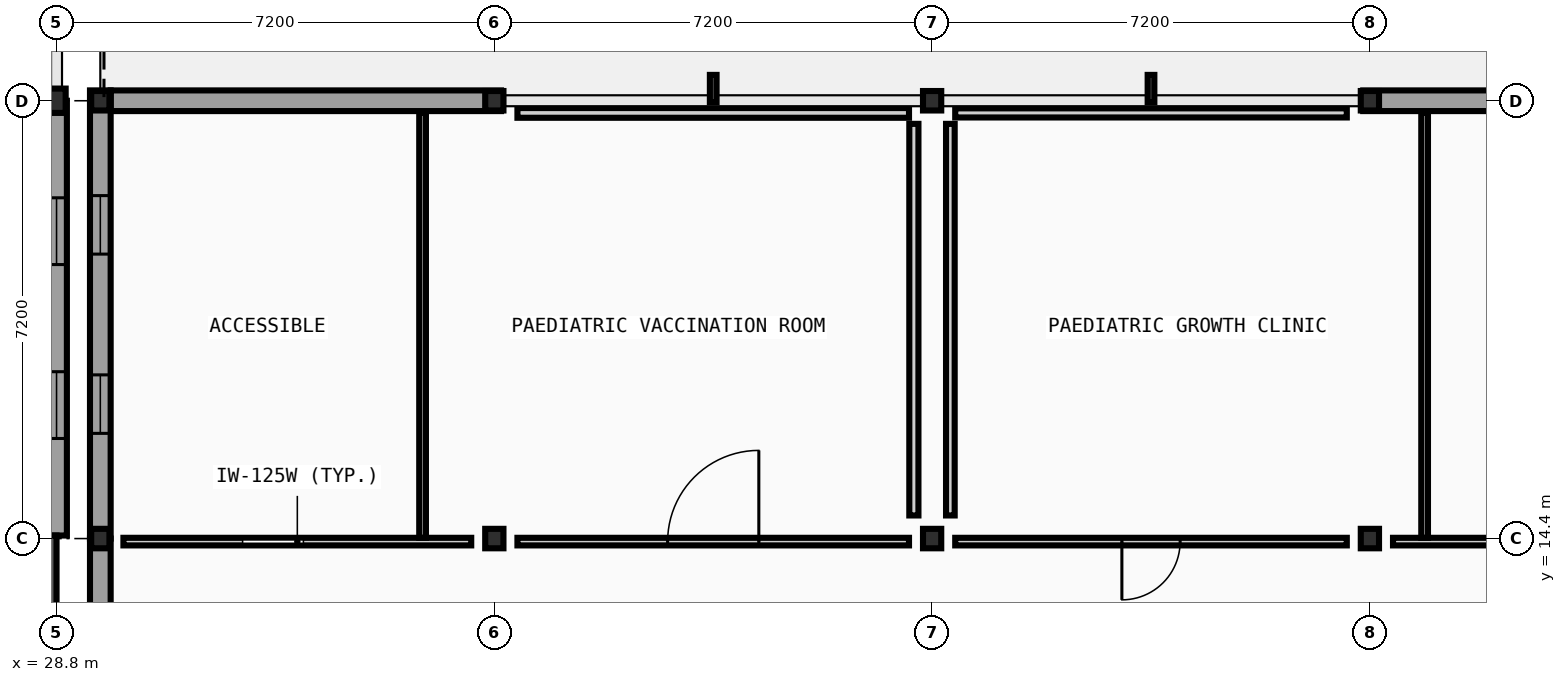
"""IFC4 building model, lengths in metres.
Left out: names, types, materials, properties, quantities, classifications, styles, units other than length and angle.
Written with IfcOpenShell. Run it as: python <this file> out.ifc"""

import sys

from ifc_helpers import new_model, si_unit, direction, frame, frame_2d, origin, origin_2d, place, context, subcontext, project, spatial, rectangle, i_section, extrude, element, fill, save


model = new_model("IFC4")
c1 = context("Model", 3, precision=1e-05, world=origin(), true_north=direction((0.0, 1.0)))
c2 = subcontext(c1, "Body", "Model", "MODEL_VIEW")
j1 = project(units=[si_unit("LENGTHUNIT", "METRE"), si_unit("PLANEANGLEUNIT", "RADIAN")], contexts=[c1])
p1 = place(None, origin())
s1 = spatial("IfcSite", under=j1, at=p1, CompositionType="ELEMENT")
p2 = place(p1, origin())
s2 = spatial("IfcBuilding", under=s1, at=p2, CompositionType="ELEMENT")
p3 = place(p2, frame((0.0, 0.0, 14.0)))
s3 = spatial("IfcBuildingStorey", under=s2, at=p3, CompositionType="ELEMENT", Elevation=14.0)
p4 = place(p3, frame((28.8, 21.6, 0.0), z_axis=(0.0, 0.0, 1.0), x_axis=(1.0, 0.0, 0.0)))
e1 = element("IfcColumn", 1, at=p4, inside=s3, PredefinedType="COLUMN", context=c2, shape_type="SweptSolid", body=[
    extrude(i_section(OverallWidth=0.3, OverallDepth=0.4, WebThickness=0.013, FlangeThickness=0.024, FilletRadius=0.027, at=origin_2d()), origin(), (0.0, 0.0, 1.0), 4.4),
])
for number, where, z_axis, x_axis in (
    (2, (29.52, 14.4, 0.0), (0.0, 0.0, 1.0), (1.0, 0.0, 0.0)),
    (3, (29.52, 21.6, 0.0), (0.0, 0.0, 1.0), (1.0, 0.0, 0.0)),
    (4, (36.0, 14.4, 0.0), (0.0, 0.0, 1.0), (1.0, 0.0, 0.0)),
    (5, (36.0, 21.6, 0.0), (0.0, 0.0, 1.0), (1.0, 0.0, 0.0)),
    (6, (43.2, 14.4, 0.0), (0.0, 0.0, 1.0), (1.0, 0.0, 0.0)),
    (7, (43.2, 21.6, 0.0), (0.0, 0.0, 1.0), (1.0, 0.0, 0.0)),
    (8, (50.4, 14.4, 0.0), (0.0, 0.0, 1.0), (1.0, 0.0, 0.0)),
    (9, (50.4, 21.6, 0.0), (0.0, 0.0, 1.0), (1.0, 0.0, 0.0)),
):
    element("IfcColumn", number, at=place(p3, frame(where, z_axis=z_axis, x_axis=x_axis)), inside=s3, PredefinedType="COLUMN", context=c2, shape_type="SweptSolid", body=[
        extrude(i_section(OverallWidth=0.3, OverallDepth=0.32, WebThickness=0.011, FlangeThickness=0.021, FilletRadius=0.027, at=origin_2d()), origin(), (0.0, 0.0, 1.0), 4.4),
    ])
p5 = place(p3, frame((28.8, 14.45, 0.0), z_axis=(0.0, 0.0, 1.0), x_axis=(0.0, 1.0, 0.0)))
e10 = element("IfcWall", 10, at=p5, inside=s3, PredefinedType="STANDARD", context=c2, shape_type="SweptSolid", body=[
    extrude(rectangle(XDim=7.15, YDim=0.34, at=frame_2d((3.575, 0.0))), origin(), (0.0, 0.0, 1.0), 4.2),
])
p6 = place(p5, frame((1.596, 0.0, 0.95)))
e11 = element("IfcOpeningElement", 11, at=p6, cuts=e10, PredefinedType="OPENING", context=c2, shape_type="SweptSolid", body=[
    extrude(rectangle(XDim=1.098, YDim=1.368, at=frame_2d((0.549, 0.684))), frame((0.0, 0.18, 0.0), z_axis=(0.0, -1.0, 0.0), x_axis=(1.0, 0.0, 0.0)), (0.0, 0.0, 1.0), 0.36),
])
p7 = place(p5, frame((4.456, 0.0, 0.95)))
e12 = element("IfcOpeningElement", 12, at=p7, cuts=e10, PredefinedType="OPENING", context=c2, shape_type="SweptSolid", body=[
    extrude(rectangle(XDim=1.098, YDim=1.368, at=frame_2d((0.549, 0.684))), frame((0.0, 0.18, 0.0), z_axis=(0.0, -1.0, 0.0), x_axis=(1.0, 0.0, 0.0)), (0.0, 0.0, 1.0), 0.36),
])
p8 = place(p3, frame((36.11, 21.6, 0.0), z_axis=(0.0, 0.0, 1.0), x_axis=(-1.0, 0.0, 0.0)))
e13 = element("IfcWall", 13, at=p8, inside=s3, PredefinedType="STANDARD", context=c2, shape_type="SweptSolid", body=[
    extrude(rectangle(XDim=6.42, YDim=0.34, at=frame_2d((3.21, 0.0))), origin(), (0.0, 0.0, 1.0), 3.935),
])
p9 = place(p3, frame((57.43, 21.6, 0.0), z_axis=(0.0, 0.0, 1.0), x_axis=(-1.0, 0.0, 0.0)))
e14 = element("IfcWall", 14, at=p9, inside=s3, PredefinedType="STANDARD", context=c2, shape_type="SweptSolid", body=[
    extrude(rectangle(XDim=7.14, YDim=0.34, at=frame_2d((3.57, 0.0))), origin(), (0.0, 0.0, 1.0), 3.935),
])
p10 = place(p9, frame((1.072, 0.0, 0.0)))
e15 = element("IfcOpeningElement", 15, at=p10, cuts=e14, PredefinedType="OPENING", context=c2, shape_type="SweptSolid", body=[
    extrude(rectangle(XDim=1.6, YDim=2.2, at=frame_2d((0.8, 1.1))), frame((0.0, 0.18, 0.0), z_axis=(0.0, -1.0, 0.0), x_axis=(1.0, 0.0, 0.0)), (0.0, 0.0, 1.0), 0.36),
])
p11 = place(p3, frame((29.52, 14.4, 0.0), z_axis=(0.0, 0.0, 1.0), x_axis=(0.0, -1.0, 0.0)))
e16 = element("IfcWall", 16, at=p11, inside=s3, PredefinedType="STANDARD", context=c2, shape_type="SweptSolid", body=[
    extrude(rectangle(XDim=5.5, YDim=0.34, at=frame_2d((2.75, 0.0))), origin(), (0.0, 0.0, 1.0), 4.2),
])
p12 = place(p3, frame((29.52, 21.77, 0.0), z_axis=(0.0, 0.0, 1.0), x_axis=(0.0, -1.0, 0.0)))
e17 = element("IfcWall", 17, at=p12, inside=s3, PredefinedType="STANDARD", context=c2, shape_type="SweptSolid", body=[
    extrude(rectangle(XDim=7.37, YDim=0.34, at=frame_2d((3.685, 0.0))), origin(), (0.0, 0.0, 1.0), 3.895),
])
p13 = place(p12, frame((1.73, 0.0, 0.95)))
e18 = element("IfcOpeningElement", 18, at=p13, cuts=e17, PredefinedType="OPENING", context=c2, shape_type="SweptSolid", body=[
    extrude(rectangle(XDim=0.962, YDim=1.404, at=frame_2d((0.481, 0.702))), frame((0.0, 0.18, 0.0), z_axis=(0.0, -1.0, 0.0), x_axis=(1.0, 0.0, 0.0)), (0.0, 0.0, 1.0), 0.36),
])
p14 = place(p12, frame((4.678, 0.0, 0.95)))
e19 = element("IfcOpeningElement", 19, at=p14, cuts=e17, PredefinedType="OPENING", context=c2, shape_type="SweptSolid", body=[
    extrude(rectangle(XDim=0.962, YDim=1.404, at=frame_2d((0.481, 0.702))), frame((0.0, 0.18, 0.0), z_axis=(0.0, -1.0, 0.0), x_axis=(1.0, 0.0, 0.0)), (0.0, 0.0, 1.0), 0.36),
])
p15 = place(p3, frame((28.6, 5.85, 0.0), z_axis=(0.0, 0.0, 1.0), x_axis=(0.0, 1.0, 0.0)))
e20 = element("IfcWall", 20, at=p15, inside=s3, PredefinedType="SHEAR", context=c2, shape_type="SweptSolid", body=[
    extrude(rectangle(XDim=8.6, YDim=0.4, at=frame_2d((4.3, 0.0))), origin(), (0.0, 0.0, 1.0), 4.2),
])
p16 = place(p3, frame((29.9, 14.35, 0.0), z_axis=(0.0, 0.0, 1.0), x_axis=(1.0, 0.0, 0.0)))
e21 = element("IfcWall", 21, at=p16, inside=s3, PredefinedType="PARTITIONING", context=c2, shape_type="SweptSolid", body=[
    extrude(rectangle(XDim=5.72, YDim=0.125, at=frame_2d((2.86, 0.0))), origin(), (0.0, 0.0, 1.0), 3.935),
])
p17 = place(p16, frame((1.96, 0.0, 0.0)))
e22 = element("IfcOpeningElement", 22, at=p17, cuts=e21, PredefinedType="OPENING", context=c2, shape_type="SweptSolid", body=[
    extrude(rectangle(XDim=1.0, YDim=2.1, at=frame_2d((0.5, 1.05))), frame((0.0, 0.073, 0.0), z_axis=(0.0, -1.0, 0.0), x_axis=(1.0, 0.0, 0.0)), (0.0, 0.0, 1.0), 0.145),
])
p18 = place(p3, frame((36.38, 14.35, 0.0), z_axis=(0.0, 0.0, 1.0), x_axis=(1.0, 0.0, 0.0)))
e23 = element("IfcWall", 23, at=p18, inside=s3, PredefinedType="PARTITIONING", context=c2, shape_type="SweptSolid", body=[
    extrude(rectangle(XDim=6.44, YDim=0.125, at=frame_2d((3.22, 0.0))), origin(), (0.0, 0.0, 1.0), 3.935),
])
p19 = place(p18, frame((2.47, 0.0, 0.0)))
e24 = element("IfcOpeningElement", 24, at=p19, cuts=e23, PredefinedType="OPENING", context=c2, shape_type="SweptSolid", body=[
    extrude(rectangle(XDim=1.5, YDim=2.2, at=frame_2d((0.75, 1.1))), frame((0.0, 0.073, 0.0), z_axis=(0.0, -1.0, 0.0), x_axis=(1.0, 0.0, 0.0)), (0.0, 0.0, 1.0), 0.145),
])
p20 = place(p3, frame((43.58, 14.35, 0.0), z_axis=(0.0, 0.0, 1.0), x_axis=(1.0, 0.0, 0.0)))
e25 = element("IfcWall", 25, at=p20, inside=s3, PredefinedType="PARTITIONING", context=c2, shape_type="SweptSolid", body=[
    extrude(rectangle(XDim=6.44, YDim=0.125, at=frame_2d((3.22, 0.0))), origin(), (0.0, 0.0, 1.0), 3.935),
])
p21 = place(p20, frame((2.741, 0.0, 0.0)))
e26 = element("IfcOpeningElement", 26, at=p21, cuts=e25, PredefinedType="OPENING", context=c2, shape_type="SweptSolid", body=[
    extrude(rectangle(XDim=0.958, YDim=2.04, at=frame_2d((0.479, 1.02))), frame((0.0, 0.073, 0.0), z_axis=(0.0, -1.0, 0.0), x_axis=(1.0, 0.0, 0.0)), (0.0, 0.0, 1.0), 0.145),
])
p22 = place(p3, frame((50.78, 14.35, 0.0), z_axis=(0.0, 0.0, 1.0), x_axis=(1.0, 0.0, 0.0)))
e27 = element("IfcWall", 27, at=p22, inside=s3, PredefinedType="PARTITIONING", context=c2, shape_type="SweptSolid", body=[
    extrude(rectangle(XDim=6.44, YDim=0.125, at=frame_2d((3.22, 0.0))), origin(), (0.0, 0.0, 1.0), 3.935),
])
p23 = place(p22, frame((3.03, 0.0, 0.0)))
e28 = element("IfcOpeningElement", 28, at=p23, cuts=e27, PredefinedType="OPENING", context=c2, shape_type="SweptSolid", body=[
    extrude(rectangle(XDim=0.9, YDim=2.1, at=frame_2d((0.45, 1.05))), frame((0.0, 0.073, 0.0), z_axis=(0.0, -1.0, 0.0), x_axis=(1.0, 0.0, 0.0)), (0.0, 0.0, 1.0), 0.145),
])
p24 = place(p3, frame((36.38, 21.4, 0.0), z_axis=(0.0, 0.0, 1.0), x_axis=(1.0, 0.0, 0.0)))
e29 = element("IfcWall", 29, at=p24, inside=s3, PredefinedType="PARTITIONING", context=c2, shape_type="SweptSolid", body=[
    extrude(rectangle(XDim=6.44, YDim=0.16, at=frame_2d((3.22, 0.0))), origin(), (0.0, 0.0, 1.0), 3.935),
])
p25 = place(p3, frame((43.58, 21.4, 0.0), z_axis=(0.0, 0.0, 1.0), x_axis=(1.0, 0.0, 0.0)))
e30 = element("IfcWall", 30, at=p25, inside=s3, PredefinedType="PARTITIONING", context=c2, shape_type="SweptSolid", body=[
    extrude(rectangle(XDim=6.44, YDim=0.15, at=frame_2d((3.22, 0.0))), origin(), (0.0, 0.0, 1.0), 3.935),
])
p26 = place(p3, frame((34.82, 14.413, 0.0), z_axis=(0.0, 0.0, 1.0), x_axis=(0.0, 1.0, 0.0)))
e31 = element("IfcWall", 31, at=p26, inside=s3, PredefinedType="PARTITIONING", context=c2, shape_type="SweptSolid", body=[
    extrude(rectangle(XDim=6.987, YDim=0.11, at=frame_2d((3.494, 0.0))), origin(), (0.0, 0.0, 1.0), 4.2),
])
p27 = place(p3, frame((42.9, 14.78, 0.0), z_axis=(0.0, 0.0, 1.0), x_axis=(0.0, 1.0, 0.0)))
e32 = element("IfcWall", 32, at=p27, inside=s3, PredefinedType="PARTITIONING", context=c2, shape_type="SweptSolid", body=[
    extrude(rectangle(XDim=6.44, YDim=0.15, at=frame_2d((3.22, 0.0))), origin(), (0.0, 0.0, 1.0), 3.895),
])
p28 = place(p3, frame((43.5, 14.78, 0.0), z_axis=(0.0, 0.0, 1.0), x_axis=(0.0, 1.0, 0.0)))
e33 = element("IfcWall", 33, at=p28, inside=s3, PredefinedType="PARTITIONING", context=c2, shape_type="SweptSolid", body=[
    extrude(rectangle(XDim=6.44, YDim=0.142, at=frame_2d((3.22, 0.0))), origin(), (0.0, 0.0, 1.0), 3.895),
])
p29 = place(p3, frame((51.3, 14.413, 0.0), z_axis=(0.0, 0.0, 1.0), x_axis=(0.0, 1.0, 0.0)))
e34 = element("IfcWall", 34, at=p29, inside=s3, PredefinedType="PARTITIONING", context=c2, shape_type="SweptSolid", body=[
    extrude(rectangle(XDim=6.987, YDim=0.11, at=frame_2d((3.494, 0.0))), origin(), (0.0, 0.0, 1.0), 4.2),
])
p30 = place(p6, origin())
e35 = element("IfcWindow", 35, at=p30, inside=s3, PartitioningType="SINGLE_PANEL", PredefinedType="WINDOW", context=c2, shape_type="SweptSolid", body=[
    extrude(rectangle(XDim=1.098, YDim=1.368, at=frame_2d((0.549, 0.684))), frame((0.0, 0.03, 0.0), z_axis=(0.0, -1.0, 0.0), x_axis=(1.0, 0.0, 0.0)), (0.0, 0.0, 1.0), 0.06),
])
fill(e11, e35)
p31 = place(p7, origin())
e36 = element("IfcWindow", 36, at=p31, inside=s3, PartitioningType="SINGLE_PANEL", PredefinedType="WINDOW", context=c2, shape_type="SweptSolid", body=[
    extrude(rectangle(XDim=1.098, YDim=1.368, at=frame_2d((0.549, 0.684))), frame((0.0, 0.03, 0.0), z_axis=(0.0, -1.0, 0.0), x_axis=(1.0, 0.0, 0.0)), (0.0, 0.0, 1.0), 0.06),
])
fill(e12, e36)
p32 = place(p13, origin())
e37 = element("IfcWindow", 37, at=p32, inside=s3, PartitioningType="SINGLE_PANEL", PredefinedType="WINDOW", context=c2, shape_type="SweptSolid", body=[
    extrude(rectangle(XDim=0.962, YDim=1.404, at=frame_2d((0.481, 0.702))), frame((0.0, 0.03, 0.0), z_axis=(0.0, -1.0, 0.0), x_axis=(1.0, 0.0, 0.0)), (0.0, 0.0, 1.0), 0.06),
])
fill(e18, e37)
p33 = place(p14, origin())
e38 = element("IfcWindow", 38, at=p33, inside=s3, PartitioningType="SINGLE_PANEL", PredefinedType="WINDOW", context=c2, shape_type="SweptSolid", body=[
    extrude(rectangle(XDim=0.962, YDim=1.404, at=frame_2d((0.481, 0.702))), frame((0.0, 0.03, 0.0), z_axis=(0.0, -1.0, 0.0), x_axis=(1.0, 0.0, 0.0)), (0.0, 0.0, 1.0), 0.06),
])
fill(e19, e38)
p34 = place(p17, frame((1.0, 0.0, 0.0), z_axis=(0.0, 0.0, 1.0), x_axis=(-1.0, 0.0, 0.0)))
e39 = element("IfcDoor", 39, at=p34, inside=s3, OperationType="SLIDING_TO_LEFT", PredefinedType="DOOR", context=c2, shape_type="SweptSolid", body=[
    extrude(rectangle(XDim=1.0, YDim=2.1, at=frame_2d((0.5, 1.05))), frame((0.0, 0.025, 0.0), z_axis=(0.0, -1.0, 0.0), x_axis=(1.0, 0.0, 0.0)), (0.0, 0.0, 1.0), 0.05),
])
fill(e22, e39)
p35 = place(p21, frame((0.958, 0.0, 0.0), z_axis=(0.0, 0.0, 1.0), x_axis=(-1.0, 0.0, 0.0)))
e40 = element("IfcDoor", 40, at=p35, inside=s3, OperationType="SINGLE_SWING_LEFT", PredefinedType="DOOR", context=c2, shape_type="SweptSolid", body=[
    extrude(rectangle(XDim=0.958, YDim=2.04, at=frame_2d((0.479, 1.02))), frame((0.0, 0.025, 0.0), z_axis=(0.0, -1.0, 0.0), x_axis=(1.0, 0.0, 0.0)), (0.0, 0.0, 1.0), 0.05),
])
fill(e26, e40)
p36 = place(p19, frame((1.5, 0.0, 0.0), z_axis=(0.0, 0.0, 1.0), x_axis=(-1.0, 0.0, 0.0)))
e41 = element("IfcDoor", 41, at=p36, inside=s3, OperationType="DOUBLE_DOOR_SINGLE_SWING", PredefinedType="DOOR", context=c2, shape_type="SweptSolid", body=[
    extrude(rectangle(XDim=1.5, YDim=2.2, at=frame_2d((0.75, 1.1))), frame((0.0, 0.025, 0.0), z_axis=(0.0, -1.0, 0.0), x_axis=(1.0, 0.0, 0.0)), (0.0, 0.0, 1.0), 0.05),
])
fill(e24, e41)
save(model, sys.argv[1])
